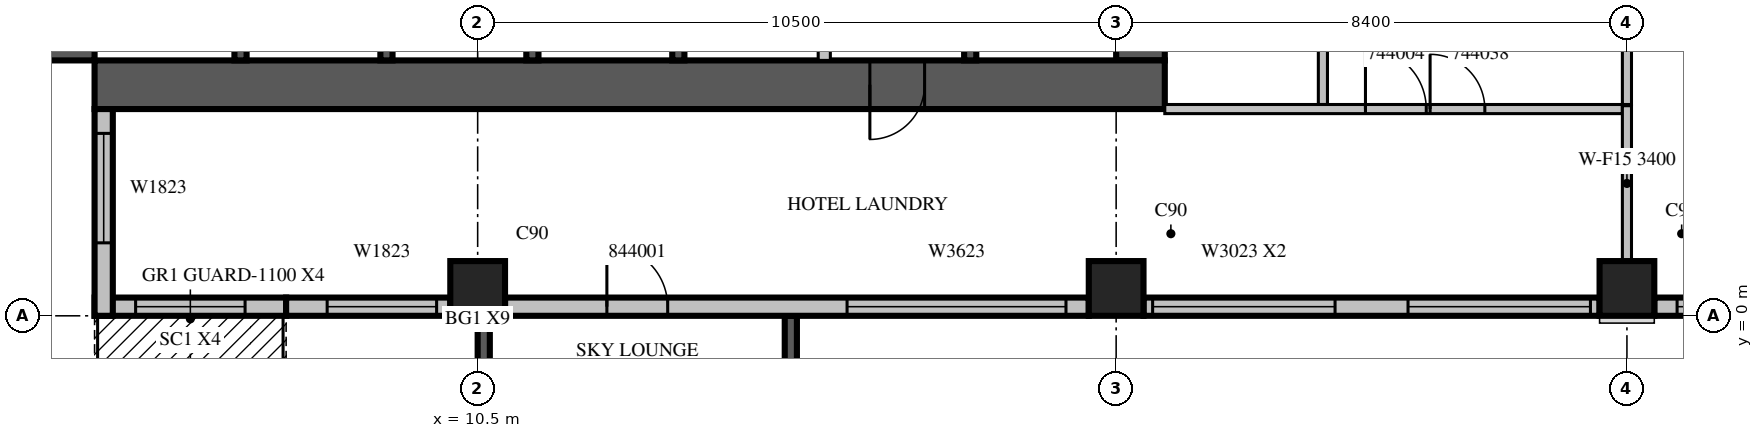
"""IFC4 building model, lengths in metres.
Left out: names, types, materials, properties, quantities, classifications, styles, units other than length and angle.
Written with IfcOpenShell. Run it as: python <this file> out.ifc"""

import sys

from ifc_helpers import new_model, si_unit, direction, frame, frame_2d, origin, origin_2d, place, context, subcontext, project, spatial, rectangle, extrude, source, transform, mapped, element, fill, save


model = new_model("IFC4")
c1 = context("Model", 3, precision=1e-05, world=origin(), true_north=direction((0.0, 1.0)))
c2 = subcontext(c1, "Body", "Model", "MODEL_VIEW")
j1 = project(units=[si_unit("LENGTHUNIT", "METRE"), si_unit("PLANEANGLEUNIT", "RADIAN")], contexts=[c1])
p1 = place(None, origin())
s1 = spatial("IfcSite", under=j1, at=p1, CompositionType="ELEMENT")
p2 = place(p1, origin())
s2 = spatial("IfcBuilding", under=s1, at=p2, CompositionType="ELEMENT")
p3 = place(p2, frame((0.0, 0.0, 200.6)))
s3 = spatial("IfcBuildingStorey", under=s2, at=p3, CompositionType="ELEMENT", Elevation=200.6)
m1 = source(origin(), c2, "Body", "SweptSolid", [
    extrude(rectangle(XDim=0.9, YDim=0.9, at=origin_2d()), origin(), (0.0, 0.0, 1.0), 3.8),
])
for number, where, z_axis, x_axis in (
    (1, (10.5, 0.45, 0.0), (0.0, 0.0, 1.0), (1.0, 0.0, 0.0)),
    (2, (21.0, 0.45, 0.0), (0.0, 0.0, 1.0), (1.0, 0.0, 0.0)),
    (3, (29.4, 0.45, 0.0), (0.0, 0.0, 1.0), (1.0, 0.0, 0.0)),
):
    element("IfcColumn", number, at=place(p3, frame(where, z_axis=z_axis, x_axis=x_axis)), inside=s3, PredefinedType="COLUMN", context=c2, shape_type="MappedRepresentation", body=[
        mapped(m1, transform((0.0, 0.0, 0.0), scale=1.0)),
    ])
m2 = source(origin(), c2, "Body", "SweptSolid", [
    extrude(rectangle(XDim=17.6, YDim=0.8, at=frame_2d((8.8, 0.0))), origin(), (0.0, 0.0, 1.0), 3.8),
])
p4 = place(p3, frame((3.8, 4.2, 0.0), z_axis=(0.0, 0.0, 1.0), x_axis=(0.0, 1.0, 0.0)))
e4 = element("IfcWall", 4, at=p4, inside=s3, PredefinedType="SHEAR", context=c2, shape_type="MappedRepresentation", body=[
    mapped(m2, transform((0.0, 0.0, 0.0), scale=1.0)),
])
m3 = source(origin(), c2, "Body", "SweptSolid", [
    extrude(rectangle(XDim=2.2, YDim=2.1, at=frame_2d((1.1, 1.05))), frame((0.0, 0.41, 0.0), z_axis=(0.0, -1.0, 0.0), x_axis=(1.0, 0.0, 0.0)), (0.0, 0.0, 1.0), 0.82),
])
p5 = place(p4, frame((4.2, 0.0, 0.0)))
e5 = element("IfcOpeningElement", 5, at=p5, cuts=e4, PredefinedType="OPENING", context=c2, shape_type="MappedRepresentation", body=[
    mapped(m3, transform((0.0, 0.0, 0.0), scale=1.0)),
])
m4 = source(origin(), c2, "Body", "SweptSolid", [
    extrude(rectangle(XDim=0.9, YDim=2.1, at=frame_2d((0.45, 1.05))), frame((0.0, 0.41, 0.0), z_axis=(0.0, -1.0, 0.0), x_axis=(1.0, 0.0, 0.0)), (0.0, 0.0, 1.0), 0.82),
])
p6 = place(p4, frame((10.95, 0.0, 0.0)))
e6 = element("IfcOpeningElement", 6, at=p6, cuts=e4, PredefinedType="OPENING", context=c2, shape_type="MappedRepresentation", body=[
    mapped(m4, transform((0.0, 0.0, 0.0), scale=1.0)),
])
m5 = source(origin(), c2, "Body", "SweptSolid", [
    extrude(rectangle(XDim=16.8, YDim=0.8, at=frame_2d((8.4, 0.0))), origin(), (0.0, 0.0, 1.0), 3.8),
])
p7 = place(p3, frame((21.4, 4.2, 0.0), z_axis=(0.0, 0.0, 1.0), x_axis=(0.0, 1.0, 0.0)))
e7 = element("IfcWall", 7, at=p7, inside=s3, PredefinedType="SHEAR", context=c2, shape_type="MappedRepresentation", body=[
    mapped(m5, transform((0.0, 0.0, 0.0), scale=1.0)),
])
p8 = place(p7, frame((4.2, 0.0, 0.0)))
e8 = element("IfcOpeningElement", 8, at=p8, cuts=e7, PredefinedType="OPENING", context=c2, shape_type="MappedRepresentation", body=[
    mapped(m3, transform((0.0, 0.0, 0.0), scale=1.0)),
])
m6 = source(origin(), c2, "Body", "SweptSolid", [
    extrude(rectangle(XDim=1.2, YDim=2.1, at=frame_2d((0.6, 1.05))), frame((0.0, 0.41, 0.0), z_axis=(0.0, -1.0, 0.0), x_axis=(1.0, 0.0, 0.0)), (0.0, 0.0, 1.0), 0.82),
])
p9 = place(p7, frame((14.7, 0.0, 0.0)))
e9 = element("IfcOpeningElement", 9, at=p9, cuts=e7, PredefinedType="OPENING", context=c2, shape_type="MappedRepresentation", body=[
    mapped(m6, transform((0.0, 0.0, 0.0), scale=1.0)),
])
p10 = place(p3, frame((4.2, 3.8, 0.0), z_axis=(0.0, 0.0, 1.0), x_axis=(1.0, 0.0, 0.0)))
e10 = element("IfcWall", 10, at=p10, inside=s3, PredefinedType="SHEAR", context=c2, shape_type="MappedRepresentation", body=[
    mapped(m2, transform((0.0, 0.0, 0.0), scale=1.0)),
])
p11 = place(p10, frame((12.75, 0.0, 0.0)))
e11 = element("IfcOpeningElement", 11, at=p11, cuts=e10, PredefinedType="OPENING", context=c2, shape_type="MappedRepresentation", body=[
    mapped(m4, transform((0.0, 0.0, 0.0), scale=1.0)),
])
m7 = source(origin(), c2, "Body", "SweptSolid", [
    extrude(rectangle(XDim=3.9, YDim=0.2, at=frame_2d((1.95, 0.0))), origin(), (0.0, 0.0, 1.0), 3.4),
])
p12 = place(p3, frame((10.6, 0.0, 0.0), z_axis=(0.0, 0.0, 1.0), x_axis=(0.0, -1.0, 0.0)))
e12 = element("IfcWall", 12, at=p12, inside=s3, PredefinedType="SOLIDWALL", context=c2, shape_type="MappedRepresentation", body=[
    mapped(m7, transform((0.0, 0.0, 0.0), scale=1.0)),
])
m8 = source(origin(), c2, "Body", "SweptSolid", [
    extrude(rectangle(XDim=2.4, YDim=2.3, at=frame_2d((1.2, 1.15))), frame((0.0, 0.11, 0.0), z_axis=(0.0, -1.0, 0.0), x_axis=(1.0, 0.0, 0.0)), (0.0, 0.0, 1.0), 0.22),
])
p13 = place(p12, frame((0.75, 0.0, 0.6)))
e13 = element("IfcOpeningElement", 13, at=p13, cuts=e12, PredefinedType="OPENING", context=c2, shape_type="MappedRepresentation", body=[
    mapped(m8, transform((0.0, 0.0, 0.0), scale=1.0)),
])
p14 = place(p3, frame((15.65, 0.0, 0.0), z_axis=(0.0, 0.0, 1.0), x_axis=(0.0, -1.0, 0.0)))
e14 = element("IfcWall", 14, at=p14, inside=s3, PredefinedType="SOLIDWALL", context=c2, shape_type="MappedRepresentation", body=[
    mapped(m7, transform((0.0, 0.0, 0.0), scale=1.0)),
])
p15 = place(p14, frame((0.75, 0.0, 0.6)))
e15 = element("IfcOpeningElement", 15, at=p15, cuts=e14, PredefinedType="OPENING", context=c2, shape_type="MappedRepresentation", body=[
    mapped(m8, transform((0.0, 0.0, 0.0), scale=1.0)),
])
m9 = source(origin(), c2, "Body", "SweptSolid", [
    extrude(rectangle(XDim=3.15, YDim=0.3, at=frame_2d((1.575, 0.0))), origin(), (0.0, 0.0, 1.0), 3.4),
])
p16 = place(p3, frame((4.2, 0.15, 0.0), z_axis=(0.0, 0.0, 1.0), x_axis=(1.0, 0.0, 0.0)))
e16 = element("IfcWall", 16, at=p16, inside=s3, PredefinedType="STANDARD", context=c2, shape_type="MappedRepresentation", body=[
    mapped(m9, transform((0.0, 0.0, 0.0), scale=1.0)),
])
m10 = source(origin(), c2, "Body", "SweptSolid", [
    extrude(rectangle(XDim=1.8, YDim=2.4, at=frame_2d((0.9, 1.2))), frame((0.0, 0.16, 0.0), z_axis=(0.0, -1.0, 0.0), x_axis=(1.0, 0.0, 0.0)), (0.0, 0.0, 1.0), 0.32),
])
p17 = place(p16, frame((0.675, 0.0, 0.0)))
e17 = element("IfcOpeningElement", 17, at=p17, cuts=e16, PredefinedType="OPENING", context=c2, shape_type="MappedRepresentation", body=[
    mapped(m10, transform((0.0, 0.0, 0.0), scale=1.0)),
])
m11 = source(origin(), c2, "Body", "SweptSolid", [
    extrude(rectangle(XDim=2.7, YDim=0.3, at=frame_2d((1.35, 0.0))), origin(), (0.0, 0.0, 1.0), 3.4),
])
p18 = place(p3, frame((7.35, 0.15, 0.0), z_axis=(0.0, 0.0, 1.0), x_axis=(1.0, 0.0, 0.0)))
e18 = element("IfcWall", 18, at=p18, inside=s3, PredefinedType="STANDARD", context=c2, shape_type="MappedRepresentation", body=[
    mapped(m11, transform((0.0, 0.0, 0.0), scale=1.0)),
])
m12 = source(origin(), c2, "Body", "SweptSolid", [
    extrude(rectangle(XDim=1.8, YDim=2.3, at=frame_2d((0.9, 1.15))), frame((0.0, 0.16, 0.0), z_axis=(0.0, -1.0, 0.0), x_axis=(1.0, 0.0, 0.0)), (0.0, 0.0, 1.0), 0.32),
])
p19 = place(p18, frame((0.675, 0.0, 0.6)))
e19 = element("IfcOpeningElement", 19, at=p19, cuts=e18, PredefinedType="OPENING", context=c2, shape_type="MappedRepresentation", body=[
    mapped(m12, transform((0.0, 0.0, 0.0), scale=1.0)),
])
m13 = source(origin(), c2, "Body", "SweptSolid", [
    extrude(rectangle(XDim=9.6, YDim=0.3, at=frame_2d((4.8, 0.0))), origin(), (0.0, 0.0, 1.0), 3.4),
])
p20 = place(p3, frame((10.95, 0.15, 0.0), z_axis=(0.0, 0.0, 1.0), x_axis=(1.0, 0.0, 0.0)))
e20 = element("IfcWall", 20, at=p20, inside=s3, PredefinedType="STANDARD", context=c2, shape_type="MappedRepresentation", body=[
    mapped(m13, transform((0.0, 0.0, 0.0), scale=1.0)),
])
m14 = source(origin(), c2, "Body", "SweptSolid", [
    extrude(rectangle(XDim=3.6, YDim=2.3, at=frame_2d((1.8, 1.15))), frame((0.0, 0.16, 0.0), z_axis=(0.0, -1.0, 0.0), x_axis=(1.0, 0.0, 0.0)), (0.0, 0.0, 1.0), 0.32),
])
p21 = place(p20, frame((5.625, 0.0, 0.6)))
e21 = element("IfcOpeningElement", 21, at=p21, cuts=e20, PredefinedType="OPENING", context=c2, shape_type="MappedRepresentation", body=[
    mapped(m14, transform((0.0, 0.0, 0.0), scale=1.0)),
])
m15 = source(origin(), c2, "Body", "SweptSolid", [
    extrude(rectangle(XDim=1.0, YDim=2.1, at=frame_2d((0.5, 1.05))), frame((0.0, 0.16, 0.0), z_axis=(0.0, -1.0, 0.0), x_axis=(1.0, 0.0, 0.0)), (0.0, 0.0, 1.0), 0.32),
])
p22 = place(p20, frame((1.675, 0.0, 0.0)))
e22 = element("IfcOpeningElement", 22, at=p22, cuts=e20, PredefinedType="OPENING", context=c2, shape_type="MappedRepresentation", body=[
    mapped(m15, transform((0.0, 0.0, 0.0), scale=1.0)),
])
m16 = source(origin(), c2, "Body", "SweptSolid", [
    extrude(rectangle(XDim=7.5, YDim=0.3, at=frame_2d((3.75, 0.0))), origin(), (0.0, 0.0, 1.0), 3.4),
])
p23 = place(p3, frame((21.45, 0.15, 0.0), z_axis=(0.0, 0.0, 1.0), x_axis=(1.0, 0.0, 0.0)))
e23 = element("IfcWall", 23, at=p23, inside=s3, PredefinedType="STANDARD", context=c2, shape_type="MappedRepresentation", body=[
    mapped(m16, transform((0.0, 0.0, 0.0), scale=1.0)),
])
m17 = source(origin(), c2, "Body", "SweptSolid", [
    extrude(rectangle(XDim=3.0, YDim=2.3, at=frame_2d((1.5, 1.15))), frame((0.0, 0.16, 0.0), z_axis=(0.0, -1.0, 0.0), x_axis=(1.0, 0.0, 0.0)), (0.0, 0.0, 1.0), 0.32),
])
p24 = place(p23, frame((0.15, 0.0, 0.6)))
e24 = element("IfcOpeningElement", 24, at=p24, cuts=e23, PredefinedType="OPENING", context=c2, shape_type="MappedRepresentation", body=[
    mapped(m17, transform((0.0, 0.0, 0.0), scale=1.0)),
])
p25 = place(p23, frame((4.35, 0.0, 0.6)))
e25 = element("IfcOpeningElement", 25, at=p25, cuts=e23, PredefinedType="OPENING", context=c2, shape_type="MappedRepresentation", body=[
    mapped(m17, transform((0.0, 0.0, 0.0), scale=1.0)),
])
m18 = source(origin(), c2, "Body", "SweptSolid", [
    extrude(rectangle(XDim=1.95, YDim=0.3, at=frame_2d((0.975, 0.0))), origin(), (0.0, 0.0, 1.0), 3.4),
])
p26 = place(p3, frame((29.85, 0.15, 0.0), z_axis=(0.0, 0.0, 1.0), x_axis=(1.0, 0.0, 0.0)))
e26 = element("IfcWall", 26, at=p26, inside=s3, PredefinedType="STANDARD", context=c2, shape_type="MappedRepresentation", body=[
    mapped(m18, transform((0.0, 0.0, 0.0), scale=1.0)),
])
m19 = source(origin(), c2, "Body", "SweptSolid", [
    extrude(rectangle(XDim=1.2, YDim=2.3, at=frame_2d((0.6, 1.15))), frame((0.0, 0.16, 0.0), z_axis=(0.0, -1.0, 0.0), x_axis=(1.0, 0.0, 0.0)), (0.0, 0.0, 1.0), 0.32),
])
p27 = place(p26, frame((0.375, 0.0, 0.6)))
e27 = element("IfcOpeningElement", 27, at=p27, cuts=e26, PredefinedType="OPENING", context=c2, shape_type="MappedRepresentation", body=[
    mapped(m19, transform((0.0, 0.0, 0.0), scale=1.0)),
])
m20 = source(origin(), c2, "Body", "SweptSolid", [
    extrude(rectangle(XDim=3.4, YDim=0.3, at=frame_2d((1.7, 0.0))), origin(), (0.0, 0.0, 1.0), 3.4),
])
p28 = place(p3, frame((4.35, 3.4, 0.0), z_axis=(0.0, 0.0, 1.0), x_axis=(0.0, -1.0, 0.0)))
e28 = element("IfcWall", 28, at=p28, inside=s3, PredefinedType="STANDARD", context=c2, shape_type="MappedRepresentation", body=[
    mapped(m20, transform((0.0, 0.0, 0.0), scale=1.0)),
])
p29 = place(p28, frame((0.4, 0.0, 0.6)))
e29 = element("IfcOpeningElement", 29, at=p29, cuts=e28, PredefinedType="OPENING", context=c2, shape_type="MappedRepresentation", body=[
    mapped(m12, transform((0.0, 0.0, 0.0), scale=1.0)),
])
m21 = source(origin(), c2, "Body", "SweptSolid", [
    extrude(rectangle(XDim=3.1, YDim=0.2, at=frame_2d((1.55, 0.0))), origin(), (0.0, 0.0, 1.0), 3.8),
])
for number, where, z_axis, x_axis in (
    (30, (6.6, 4.2, 0.0), (0.0, 0.0, 1.0), (0.0, 1.0, 0.0)),
    (31, (9.0, 4.2, 0.0), (0.0, 0.0, 1.0), (0.0, 1.0, 0.0)),
    (32, (11.4, 4.2, 0.0), (0.0, 0.0, 1.0), (0.0, 1.0, 0.0)),
):
    element("IfcWall", number, at=place(p3, frame(where, z_axis=z_axis, x_axis=x_axis)), inside=s3, PredefinedType="SOLIDWALL", context=c2, shape_type="MappedRepresentation", body=[
        mapped(m21, transform((0.0, 0.0, 0.0), scale=1.0)),
    ])
m22 = source(origin(), c2, "Body", "SweptSolid", [
    extrude(rectangle(XDim=3.1, YDim=0.2, at=frame_2d((1.55, 0.0))), origin(), (0.0, 0.0, 1.0), 3.4),
])
for number, where, z_axis, x_axis in (
    (33, (13.8, 4.2, 0.0), (0.0, 0.0, 1.0), (0.0, 1.0, 0.0)),
    (34, (18.6, 4.2, 0.0), (0.0, 0.0, 1.0), (0.0, 1.0, 0.0)),
):
    element("IfcWall", number, at=place(p3, frame(where, z_axis=z_axis, x_axis=x_axis)), inside=s3, PredefinedType="SOLIDWALL", context=c2, shape_type="MappedRepresentation", body=[
        mapped(m22, transform((0.0, 0.0, 0.0), scale=1.0)),
    ])
m23 = source(origin(), c2, "Body", "SweptSolid", [
    extrude(rectangle(XDim=3.1, YDim=0.2, at=frame_2d((1.55, 0.0))), origin(), (0.0, 0.0, 1.0), 3.4),
])
p30 = place(p3, frame((16.2, 4.2, 0.0), z_axis=(0.0, 0.0, 1.0), x_axis=(0.0, 1.0, 0.0)))
e35 = element("IfcWall", 35, at=p30, inside=s3, PredefinedType="PARTITIONING", context=c2, shape_type="MappedRepresentation", body=[
    mapped(m23, transform((0.0, 0.0, 0.0), scale=1.0)),
])
m24 = source(origin(), c2, "Body", "SweptSolid", [
    extrude(rectangle(XDim=11.525, YDim=0.15, at=frame_2d((5.763, 0.0))), origin(), (0.0, 0.0, 1.0), 3.4),
])
p31 = place(p3, frame((24.4, 15.0, 0.0), z_axis=(0.0, 0.0, 1.0), x_axis=(0.0, -1.0, 0.0)))
e36 = element("IfcWall", 36, at=p31, inside=s3, PredefinedType="PARTITIONING", context=c2, shape_type="MappedRepresentation", body=[
    mapped(m24, transform((0.0, 0.0, 0.0), scale=1.0)),
])
m25 = source(origin(), c2, "Body", "SweptSolid", [
    extrude(rectangle(XDim=0.9, YDim=2.1, at=frame_2d((0.45, 1.05))), frame((0.0, 0.085, 0.0), z_axis=(0.0, -1.0, 0.0), x_axis=(1.0, 0.0, 0.0)), (0.0, 0.0, 1.0), 0.17),
])
p32 = place(p31, frame((6.963, 0.0, 0.0)))
e37 = element("IfcOpeningElement", 37, at=p32, cuts=e36, PredefinedType="OPENING", context=c2, shape_type="MappedRepresentation", body=[
    mapped(m25, transform((0.0, 0.0, 0.0), scale=1.0)),
])
p33 = place(p31, frame((0.325, 0.0, 0.0)))
e38 = element("IfcOpeningElement", 38, at=p33, cuts=e36, PredefinedType="OPENING", context=c2, shape_type="MappedRepresentation", body=[
    mapped(m25, transform((0.0, 0.0, 0.0), scale=1.0)),
])
m26 = source(origin(), c2, "Body", "SweptSolid", [
    extrude(rectangle(XDim=6.576, YDim=0.15, at=frame_2d((3.288, 0.0))), origin(), (0.0, 0.0, 1.0), 3.4),
])
p34 = place(p3, frame((29.4, 3.475, 0.0), z_axis=(0.0, 0.0, 1.0), x_axis=(0.0, 1.0, 0.0)))
e39 = element("IfcWall", 39, at=p34, inside=s3, PredefinedType="PARTITIONING", context=c2, shape_type="MappedRepresentation", body=[
    mapped(m26, transform((0.0, 0.0, 0.0), scale=1.0)),
])
m27 = source(origin(), c2, "Body", "SweptSolid", [
    extrude(rectangle(XDim=7.525, YDim=0.15, at=frame_2d((3.763, 0.0))), origin(), (0.0, 0.0, 1.0), 3.4),
])
p35 = place(p3, frame((21.8, 3.4, 0.0), z_axis=(0.0, 0.0, 1.0), x_axis=(1.0, 0.0, 0.0)))
e40 = element("IfcWall", 40, at=p35, inside=s3, PredefinedType="PARTITIONING", context=c2, shape_type="MappedRepresentation", body=[
    mapped(m27, transform((0.0, 0.0, 0.0), scale=1.0)),
])
m28 = source(origin(), c2, "Body", "SweptSolid", [
    extrude(rectangle(XDim=1.0, YDim=2.1, at=frame_2d((0.5, 1.05))), frame((0.0, 0.085, 0.0), z_axis=(0.0, -1.0, 0.0), x_axis=(1.0, 0.0, 0.0)), (0.0, 0.0, 1.0), 0.17),
])
p36 = place(p35, frame((3.3, 0.0, 0.0)))
e41 = element("IfcOpeningElement", 41, at=p36, cuts=e40, PredefinedType="OPENING", context=c2, shape_type="MappedRepresentation", body=[
    mapped(m28, transform((0.0, 0.0, 0.0), scale=1.0)),
])
p37 = place(p35, frame((4.363, 0.0, 0.0)))
e42 = element("IfcOpeningElement", 42, at=p37, cuts=e40, PredefinedType="OPENING", context=c2, shape_type="MappedRepresentation", body=[
    mapped(m25, transform((0.0, 0.0, 0.0), scale=1.0)),
])
m29 = source(origin(), c2, "Body", "SweptSolid", [
    extrude(rectangle(XDim=2.556, YDim=0.15, at=frame_2d((1.278, 0.0))), origin(), (0.0, 0.0, 1.0), 3.4),
])
p38 = place(p3, frame((29.4, 0.899, 0.0), z_axis=(0.0, 0.0, 1.0), x_axis=(0.0, 1.0, 0.0)))
e43 = element("IfcWall", 43, at=p38, inside=s3, PredefinedType="PARTITIONING", context=c2, shape_type="MappedRepresentation", body=[
    mapped(m29, transform((0.0, 0.0, 0.0), scale=1.0)),
])
m30 = source(origin(), c2, "Body", "SweptSolid", [
    extrude(rectangle(XDim=1.8, YDim=2.4, at=frame_2d((0.9, 1.2))), frame((0.0, 0.025, 0.0), z_axis=(0.0, -1.0, 0.0), x_axis=(1.0, 0.0, 0.0)), (0.0, 0.0, 1.0), 0.05),
])
p39 = place(p17, origin())
e44 = element("IfcDoor", 44, at=p39, inside=s3, OperationType="SLIDING_TO_LEFT", PredefinedType="DOOR", context=c2, shape_type="MappedRepresentation", body=[
    mapped(m30, transform((0.0, 0.0, 0.0), scale=1.0)),
])
fill(e17, e44)
m31 = source(origin(), c2, "Body", "SweptSolid", [
    extrude(rectangle(XDim=1.8, YDim=2.3, at=frame_2d((0.9, 1.15))), frame((0.0, 0.03, 0.0), z_axis=(0.0, -1.0, 0.0), x_axis=(1.0, 0.0, 0.0)), (0.0, 0.0, 1.0), 0.06),
])
p40 = place(p19, origin())
e45 = element("IfcWindow", 45, at=p40, inside=s3, PartitioningType="SINGLE_PANEL", PredefinedType="WINDOW", context=c2, shape_type="MappedRepresentation", body=[
    mapped(m31, transform((0.0, 0.0, 0.0), scale=1.0)),
])
fill(e19, e45)
m32 = source(origin(), c2, "Body", "SweptSolid", [
    extrude(rectangle(XDim=3.6, YDim=2.3, at=frame_2d((1.8, 1.15))), frame((0.0, 0.03, 0.0), z_axis=(0.0, -1.0, 0.0), x_axis=(1.0, 0.0, 0.0)), (0.0, 0.0, 1.0), 0.06),
])
p41 = place(p21, origin())
e46 = element("IfcWindow", 46, at=p41, inside=s3, PartitioningType="SINGLE_PANEL", PredefinedType="WINDOW", context=c2, shape_type="MappedRepresentation", body=[
    mapped(m32, transform((0.0, 0.0, 0.0), scale=1.0)),
])
fill(e21, e46)
m33 = source(origin(), c2, "Body", "SweptSolid", [
    extrude(rectangle(XDim=3.0, YDim=2.3, at=frame_2d((1.5, 1.15))), frame((0.0, 0.03, 0.0), z_axis=(0.0, -1.0, 0.0), x_axis=(1.0, 0.0, 0.0)), (0.0, 0.0, 1.0), 0.06),
])
p42 = place(p24, origin())
e47 = element("IfcWindow", 47, at=p42, inside=s3, PartitioningType="SINGLE_PANEL", PredefinedType="WINDOW", context=c2, shape_type="MappedRepresentation", body=[
    mapped(m33, transform((0.0, 0.0, 0.0), scale=1.0)),
])
fill(e24, e47)
p43 = place(p25, origin())
e48 = element("IfcWindow", 48, at=p43, inside=s3, PartitioningType="SINGLE_PANEL", PredefinedType="WINDOW", context=c2, shape_type="MappedRepresentation", body=[
    mapped(m33, transform((0.0, 0.0, 0.0), scale=1.0)),
])
fill(e25, e48)
m34 = source(origin(), c2, "Body", "SweptSolid", [
    extrude(rectangle(XDim=1.2, YDim=2.3, at=frame_2d((0.6, 1.15))), frame((0.0, 0.03, 0.0), z_axis=(0.0, -1.0, 0.0), x_axis=(1.0, 0.0, 0.0)), (0.0, 0.0, 1.0), 0.06),
])
p44 = place(p27, origin())
e49 = element("IfcWindow", 49, at=p44, inside=s3, PartitioningType="SINGLE_PANEL", PredefinedType="WINDOW", context=c2, shape_type="MappedRepresentation", body=[
    mapped(m34, transform((0.0, 0.0, 0.0), scale=1.0)),
])
fill(e27, e49)
p45 = place(p29, origin())
e50 = element("IfcWindow", 50, at=p45, inside=s3, PartitioningType="SINGLE_PANEL", PredefinedType="WINDOW", context=c2, shape_type="MappedRepresentation", body=[
    mapped(m31, transform((0.0, 0.0, 0.0), scale=1.0)),
])
fill(e29, e50)
m35 = source(origin(), c2, "Body", "SweptSolid", [
    extrude(rectangle(XDim=0.9, YDim=2.1, at=frame_2d((0.45, 1.05))), frame((0.0, 0.025, 0.0), z_axis=(0.0, -1.0, 0.0), x_axis=(1.0, 0.0, 0.0)), (0.0, 0.0, 1.0), 0.05),
])
p46 = place(p11, origin())
e51 = element("IfcDoor", 51, at=p46, inside=s3, OperationType="SINGLE_SWING_RIGHT", PredefinedType="DOOR", context=c2, shape_type="MappedRepresentation", body=[
    mapped(m35, transform((0.0, 0.0, 0.0), scale=1.0)),
])
fill(e11, e51)
m36 = source(origin(), c2, "Body", "SweptSolid", [
    extrude(rectangle(XDim=1.0, YDim=2.1, at=frame_2d((0.5, 1.05))), frame((0.0, 0.025, 0.0), z_axis=(0.0, -1.0, 0.0), x_axis=(1.0, 0.0, 0.0)), (0.0, 0.0, 1.0), 0.05),
])
p47 = place(p36, origin())
e52 = element("IfcDoor", 52, at=p47, inside=s3, OperationType="SINGLE_SWING_LEFT", PredefinedType="DOOR", context=c2, shape_type="MappedRepresentation", body=[
    mapped(m36, transform((0.0, 0.0, 0.0), scale=1.0)),
])
fill(e41, e52)
p48 = place(p37, origin())
e53 = element("IfcDoor", 53, at=p48, inside=s3, OperationType="SINGLE_SWING_LEFT", PredefinedType="DOOR", context=c2, shape_type="MappedRepresentation", body=[
    mapped(m35, transform((0.0, 0.0, 0.0), scale=1.0)),
])
fill(e42, e53)
p49 = place(p22, origin())
e54 = element("IfcDoor", 54, at=p49, inside=s3, OperationType="SINGLE_SWING_LEFT", PredefinedType="DOOR", context=c2, shape_type="MappedRepresentation", body=[
    mapped(m36, transform((0.0, 0.0, 0.0), scale=1.0)),
])
fill(e22, e54)
save(model, sys.argv[1])
